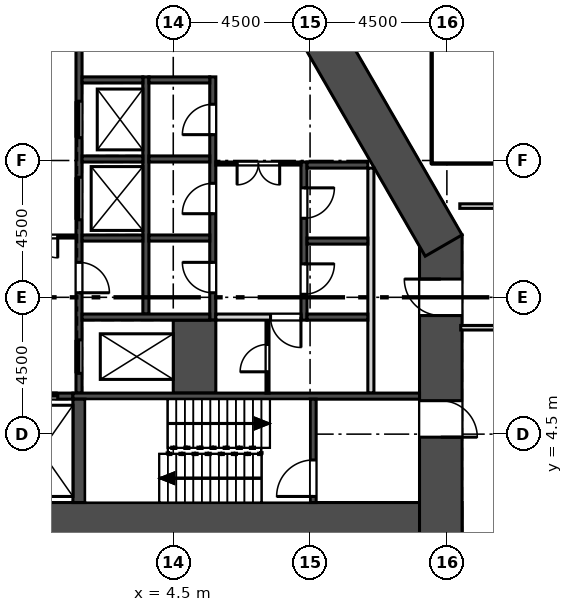
"""IFC4 building model, lengths in metres.
Left out: names, types, materials, properties, quantities, classifications, styles, units other than length and angle.
Written with IfcOpenShell. Run it as: python <this file> out.ifc"""

import sys

from ifc_helpers import new_model, si_unit, direction, frame, frame_2d, origin, place, context, subcontext, project, spatial, rectangle, extrude, element, fill, save


model = new_model("IFC4")
c1 = context("Model", 3, precision=1e-05, world=origin(), true_north=direction((0.0, 1.0)))
c2 = subcontext(c1, "Body", "Model", "MODEL_VIEW")
j1 = project(units=[si_unit("LENGTHUNIT", "METRE"), si_unit("PLANEANGLEUNIT", "RADIAN")], contexts=[c1])
p1 = place(None, origin())
s1 = spatial("IfcSite", under=j1, at=p1, CompositionType="ELEMENT")
p2 = place(p1, origin())
s2 = spatial("IfcBuilding", under=s1, at=p2, CompositionType="ELEMENT")
p3 = place(p2, origin())
s3 = spatial("IfcBuildingStorey", under=s2, at=p3, CompositionType="ELEMENT", Elevation=0.0)
p4 = place(p3, frame((-14.0, 1.55, 0.0), z_axis=(0.0, 0.0, 1.0), x_axis=(1.0, 0.0, 0.0)))
e1 = element("IfcWall", 1, at=p4, inside=s3, PredefinedType="SHEAR", context=c2, shape_type="SweptSolid", body=[
    extrude(rectangle(XDim=28.0, YDim=1.4, at=frame_2d((14.0, 0.0))), origin(), (0.0, 0.0, 1.0), 8.0),
])
p5 = place(p3, frame((13.3, 0.85, 0.0), z_axis=(0.0, 0.0, 1.0), x_axis=(0.0, 1.0, 0.0)))
e2 = element("IfcWall", 2, at=p5, inside=s3, PredefinedType="SHEAR", context=c2, shape_type="SweptSolid", body=[
    extrude(rectangle(XDim=10.202, YDim=1.4, at=frame_2d((5.101, 0.0))), origin(), (0.0, 0.0, 1.0), 8.0),
])
p6 = place(p5, frame((3.55, 0.0, 0.0)))
e3 = element("IfcOpeningElement", 3, at=p6, cuts=e2, PredefinedType="OPENING", context=c2, shape_type="SweptSolid", body=[
    extrude(rectangle(XDim=1.2, YDim=2.1, at=frame_2d((0.6, 1.05))), frame((0.0, 0.71, 0.0), z_axis=(0.0, -1.0, 0.0), x_axis=(1.0, 0.0, 0.0)), (0.0, 0.0, 1.0), 1.42),
])
p7 = place(p5, frame((7.55, 0.0, 0.0)))
e4 = element("IfcOpeningElement", 4, at=p7, cuts=e2, PredefinedType="OPENING", context=c2, shape_type="SweptSolid", body=[
    extrude(rectangle(XDim=1.2, YDim=2.1, at=frame_2d((0.6, 1.05))), frame((0.0, 0.71, 0.0), z_axis=(0.0, -1.0, 0.0), x_axis=(1.0, 0.0, 0.0)), (0.0, 0.0, 1.0), 1.42),
])
p8 = place(p3, frame((13.394, 10.703, 0.0), z_axis=(0.0, 0.0, 1.0), x_axis=(-0.50000187635, 0.866024320471, 0.0)))
e5 = element("IfcWall", 5, at=p8, inside=s3, PredefinedType="SHEAR", context=c2, shape_type="SweptSolid", body=[
    extrude(rectangle(XDim=9.177, YDim=1.4, at=frame_2d((4.588, 0.0))), origin(), (0.0, 0.0, 1.0), 8.0),
])
p9 = place(p3, frame((11.0, 5.85, 0.0), z_axis=(0.0, 0.0, 1.0), x_axis=(0.0, 1.0, 0.0)))
e6 = element("IfcWall", 6, at=p9, inside=s3, PredefinedType="SOLIDWALL", context=c2, shape_type="SweptSolid", body=[
    extrude(rectangle(XDim=7.4, YDim=0.2, at=frame_2d((3.7, 0.0))), origin(), (0.0, 0.0, 1.0), 7.7),
])
p10 = place(p3, frame((8.8, 8.25, -0.4), z_axis=(0.0, 0.0, 1.0), x_axis=(0.0, 1.0, 0.0)))
e7 = element("IfcWall", 7, at=p10, inside=s3, PredefinedType="SOLIDWALL", context=c2, shape_type="SweptSolid", body=[
    extrude(rectangle(XDim=5.2, YDim=0.2, at=frame_2d((2.6, 0.0))), origin(), (0.0, 0.0, 1.0), 8.1),
])
p11 = place(p10, frame((0.85, 0.0, 0.4)))
e8 = element("IfcOpeningElement", 8, at=p11, cuts=e7, PredefinedType="OPENING", context=c2, shape_type="SweptSolid", body=[
    extrude(rectangle(XDim=1.0, YDim=2.1, at=frame_2d((0.5, 1.05))), frame((0.0, 0.11, 0.0), z_axis=(0.0, -1.0, 0.0), x_axis=(1.0, 0.0, 0.0)), (0.0, 0.0, 1.0), 0.22),
])
p12 = place(p10, frame((3.35, 0.0, 0.4)))
e9 = element("IfcOpeningElement", 9, at=p12, cuts=e7, PredefinedType="OPENING", context=c2, shape_type="SweptSolid", body=[
    extrude(rectangle(XDim=1.0, YDim=2.1, at=frame_2d((0.5, 1.05))), frame((0.0, 0.11, 0.0), z_axis=(0.0, -1.0, 0.0), x_axis=(1.0, 0.0, 0.0)), (0.0, 0.0, 1.0), 0.22),
])
p13 = place(p3, frame((5.8, 8.25, -0.4), z_axis=(0.0, 0.0, 1.0), x_axis=(0.0, 1.0, 0.0)))
e10 = element("IfcWall", 10, at=p13, inside=s3, PredefinedType="SOLIDWALL", context=c2, shape_type="SweptSolid", body=[
    extrude(rectangle(XDim=8.0, YDim=0.2, at=frame_2d((4.0, 0.0))), origin(), (0.0, 0.0, 1.0), 8.1),
])
p14 = place(p13, frame((0.9, 0.0, 0.4)))
e11 = element("IfcOpeningElement", 11, at=p14, cuts=e10, PredefinedType="OPENING", context=c2, shape_type="SweptSolid", body=[
    extrude(rectangle(XDim=1.0, YDim=2.1, at=frame_2d((0.5, 1.05))), frame((0.0, 0.11, 0.0), z_axis=(0.0, -1.0, 0.0), x_axis=(1.0, 0.0, 0.0)), (0.0, 0.0, 1.0), 0.22),
])
p15 = place(p13, frame((3.5, 0.0, 0.4)))
e12 = element("IfcOpeningElement", 12, at=p15, cuts=e10, PredefinedType="OPENING", context=c2, shape_type="SweptSolid", body=[
    extrude(rectangle(XDim=1.0, YDim=2.1, at=frame_2d((0.5, 1.05))), frame((0.0, 0.11, 0.0), z_axis=(0.0, -1.0, 0.0), x_axis=(1.0, 0.0, 0.0)), (0.0, 0.0, 1.0), 0.22),
])
p16 = place(p13, frame((6.1, 0.0, 0.4)))
e13 = element("IfcOpeningElement", 13, at=p16, cuts=e10, PredefinedType="OPENING", context=c2, shape_type="SweptSolid", body=[
    extrude(rectangle(XDim=1.0, YDim=2.1, at=frame_2d((0.5, 1.05))), frame((0.0, 0.11, 0.0), z_axis=(0.0, -1.0, 0.0), x_axis=(1.0, 0.0, 0.0)), (0.0, 0.0, 1.0), 0.22),
])
p17 = place(p3, frame((3.6, 8.45, -0.4), z_axis=(0.0, 0.0, 1.0), x_axis=(0.0, 1.0, 0.0)))
e14 = element("IfcWall", 14, at=p17, inside=s3, PredefinedType="SOLIDWALL", context=c2, shape_type="SweptSolid", body=[
    extrude(rectangle(XDim=7.8, YDim=0.2, at=frame_2d((3.9, 0.0))), origin(), (0.0, 0.0, 1.0), 8.1),
])
p18 = place(p3, frame((1.4, 5.85, -0.4), z_axis=(0.0, 0.0, 1.0), x_axis=(0.0, 1.0, 0.0)))
e15 = element("IfcWall", 15, at=p18, inside=s3, PredefinedType="SOLIDWALL", context=c2, shape_type="SweptSolid", body=[
    extrude(rectangle(XDim=11.75, YDim=0.2, at=frame_2d((5.875, 0.0))), origin(), (0.0, 0.0, 1.0), 8.1),
])
p19 = place(p18, frame((5.7, 0.0, 0.4)))
e16 = element("IfcOpeningElement", 16, at=p19, cuts=e15, PredefinedType="OPENING", context=c2, shape_type="SweptSolid", body=[
    extrude(rectangle(XDim=1.4, YDim=2.1, at=frame_2d((0.7, 1.05))), frame((0.0, 0.11, 0.0), z_axis=(0.0, -1.0, 0.0), x_axis=(1.0, 0.0, 0.0)), (0.0, 0.0, 1.0), 0.22),
])
p20 = place(p18, frame((8.4, 0.0, 0.4)))
e17 = element("IfcOpeningElement", 17, at=p20, cuts=e15, PredefinedType="OPENING", context=c2, shape_type="SweptSolid", body=[
    extrude(rectangle(XDim=1.2, YDim=2.1, at=frame_2d((0.6, 1.05))), frame((0.0, 0.11, 0.0), z_axis=(0.0, -1.0, 0.0), x_axis=(1.0, 0.0, 0.0)), (0.0, 0.0, 1.0), 0.22),
])
p21 = place(p18, frame((0.65, 0.0, 0.4)))
e18 = element("IfcOpeningElement", 18, at=p21, cuts=e15, PredefinedType="OPENING", context=c2, shape_type="SweptSolid", body=[
    extrude(rectangle(XDim=1.1, YDim=2.1, at=frame_2d((0.55, 1.05))), frame((0.0, 0.11, 0.0), z_axis=(0.0, -1.0, 0.0), x_axis=(1.0, 0.0, 0.0)), (0.0, 0.0, 1.0), 0.22),
])
p22 = place(p18, frame((3.3, 0.0, 0.4)))
e19 = element("IfcOpeningElement", 19, at=p22, cuts=e15, PredefinedType="OPENING", context=c2, shape_type="SweptSolid", body=[
    extrude(rectangle(XDim=1.0, YDim=2.1, at=frame_2d((0.5, 1.05))), frame((0.0, 0.11, 0.0), z_axis=(0.0, -1.0, 0.0), x_axis=(1.0, 0.0, 0.0)), (0.0, 0.0, 1.0), 0.22),
])
p23 = place(p3, frame((5.2, 5.85, -0.4), z_axis=(0.0, 0.0, 1.0), x_axis=(0.0, 1.0, 0.0)))
e20 = element("IfcWall", 20, at=p23, inside=s3, PredefinedType="SOLIDWALL", context=c2, shape_type="SweptSolid", body=[
    extrude(rectangle(XDim=2.4, YDim=1.4, at=frame_2d((1.2, 0.0))), origin(), (0.0, 0.0, 1.0), 8.1),
])
p24 = place(p3, frame((8.9, 8.35, -0.4), z_axis=(0.0, 0.0, 1.0), x_axis=(1.0, 0.0, 0.0)))
e21 = element("IfcWall", 21, at=p24, inside=s3, PredefinedType="SOLIDWALL", context=c2, shape_type="SweptSolid", body=[
    extrude(rectangle(XDim=2.0, YDim=0.2, at=frame_2d((1.0, 0.0))), origin(), (0.0, 0.0, 1.0), 8.1),
])
p25 = place(p3, frame((1.5, 8.35, -0.4), z_axis=(0.0, 0.0, 1.0), x_axis=(1.0, 0.0, 0.0)))
e22 = element("IfcWall", 22, at=p25, inside=s3, PredefinedType="SOLIDWALL", context=c2, shape_type="SweptSolid", body=[
    extrude(rectangle(XDim=4.2, YDim=0.2, at=frame_2d((2.1, 0.0))), origin(), (0.0, 0.0, 1.0), 8.1),
])
p26 = place(p3, frame((-1.2, 5.75, -0.4), z_axis=(0.0, 0.0, 1.0), x_axis=(1.0, 0.0, 0.0)))
e23 = element("IfcWall", 23, at=p26, inside=s3, PredefinedType="SOLIDWALL", context=c2, shape_type="SweptSolid", body=[
    extrude(rectangle(XDim=2.4, YDim=0.2, at=frame_2d((1.2, 0.0))), origin(), (0.0, 0.0, 1.0), 8.1),
])
p27 = place(p26, frame((0.5, 0.0, 0.4)))
e24 = element("IfcOpeningElement", 24, at=p27, cuts=e23, PredefinedType="OPENING", context=c2, shape_type="SweptSolid", body=[
    extrude(rectangle(XDim=1.4, YDim=2.1, at=frame_2d((0.7, 1.05))), frame((0.0, 0.11, 0.0), z_axis=(0.0, -1.0, 0.0), x_axis=(1.0, 0.0, 0.0)), (0.0, 0.0, 1.0), 0.22),
])
p28 = place(p3, frame((1.2, 5.75, -0.4), z_axis=(0.0, 0.0, 1.0), x_axis=(1.0, 0.0, 0.0)))
e25 = element("IfcWall", 25, at=p28, inside=s3, PredefinedType="SOLIDWALL", context=c2, shape_type="SweptSolid", body=[
    extrude(rectangle(XDim=11.4, YDim=0.2, at=frame_2d((5.7, 0.0))), origin(), (0.0, 0.0, 1.0), 8.1),
])
p29 = place(p3, frame((9.1, 2.25, -0.4), z_axis=(0.0, 0.0, 1.0), x_axis=(0.0, 1.0, 0.0)))
e26 = element("IfcWall", 26, at=p29, inside=s3, PredefinedType="SOLIDWALL", context=c2, shape_type="SweptSolid", body=[
    extrude(rectangle(XDim=3.4, YDim=0.2, at=frame_2d((1.7, 0.0))), origin(), (0.0, 0.0, 1.0), 8.1),
])
p30 = place(p29, frame((0.2, 0.0, 0.4)))
e27 = element("IfcOpeningElement", 27, at=p30, cuts=e26, PredefinedType="OPENING", context=c2, shape_type="SweptSolid", body=[
    extrude(rectangle(XDim=1.2, YDim=2.1, at=frame_2d((0.6, 1.05))), frame((0.0, 0.11, 0.0), z_axis=(0.0, -1.0, 0.0), x_axis=(1.0, 0.0, 0.0)), (0.0, 0.0, 1.0), 0.22),
])
p31 = place(p3, frame((1.4, 2.25, -0.4), z_axis=(0.0, 0.0, 1.0), x_axis=(0.0, 1.0, 0.0)))
e28 = element("IfcWall", 28, at=p31, inside=s3, PredefinedType="SOLIDWALL", context=c2, shape_type="SweptSolid", body=[
    extrude(rectangle(XDim=3.4, YDim=0.4, at=frame_2d((1.7, 0.0))), origin(), (0.0, 0.0, 1.0), 8.1),
])
for number, where, z_axis, x_axis in (
    (29, (8.9, 10.85, -0.4), (0.0, 0.0, 1.0), (1.0, 0.0, 0.0)),
    (30, (8.9, 13.35, -0.4), (0.0, 0.0, 1.0), (1.0, 0.0, 0.0)),
    (31, (3.7, 10.95, -0.4), (0.0, 0.0, 1.0), (1.0, 0.0, 0.0)),
    (32, (3.7, 13.55, -0.4), (0.0, 0.0, 1.0), (1.0, 0.0, 0.0)),
    (33, (3.7, 16.15, -0.4), (0.0, 0.0, 1.0), (1.0, 0.0, 0.0)),
    (34, (1.5, 10.95, -0.4), (0.0, 0.0, 1.0), (1.0, 0.0, 0.0)),
    (35, (1.5, 13.55, -0.4), (0.0, 0.0, 1.0), (1.0, 0.0, 0.0)),
    (36, (1.5, 16.15, -0.4), (0.0, 0.0, 1.0), (1.0, 0.0, 0.0)),
):
    element("IfcWall", number, at=place(p3, frame(where, z_axis=z_axis, x_axis=x_axis)), inside=s3, PredefinedType="SOLIDWALL", context=c2, shape_type="SweptSolid", body=[
        extrude(rectangle(XDim=2.0, YDim=0.2, at=frame_2d((1.0, 0.0))), origin(), (0.0, 0.0, 1.0), 8.1),
    ])
p32 = place(p3, frame((5.9, 13.4, 0.0), z_axis=(0.0, 0.0, 1.0), x_axis=(1.0, 0.0, 0.0)))
e37 = element("IfcWall", 37, at=p32, inside=s3, PredefinedType="PARTITIONING", context=c2, shape_type="SweptSolid", body=[
    extrude(rectangle(XDim=2.8, YDim=0.1, at=frame_2d((1.4, 0.0))), origin(), (0.0, 0.0, 1.0), 7.7),
])
p33 = place(p32, frame((0.7, 0.0, 0.0)))
e38 = element("IfcOpeningElement", 38, at=p33, cuts=e37, PredefinedType="OPENING", context=c2, shape_type="SweptSolid", body=[
    extrude(rectangle(XDim=1.4, YDim=2.1, at=frame_2d((0.7, 1.05))), frame((0.0, 0.06, 0.0), z_axis=(0.0, -1.0, 0.0), x_axis=(1.0, 0.0, 0.0)), (0.0, 0.0, 1.0), 0.12),
])
p34 = place(p3, frame((7.6, 5.85, 0.0), z_axis=(0.0, 0.0, 1.0), x_axis=(0.0, 1.0, 0.0)))
e39 = element("IfcWall", 39, at=p34, inside=s3, PredefinedType="PARTITIONING", context=c2, shape_type="SweptSolid", body=[
    extrude(rectangle(XDim=2.4, YDim=0.1, at=frame_2d((1.2, 0.0))), origin(), (0.0, 0.0, 1.0), 7.7),
])
p35 = place(p34, frame((0.7, 0.0, 0.0)))
e40 = element("IfcOpeningElement", 40, at=p35, cuts=e39, PredefinedType="OPENING", context=c2, shape_type="SweptSolid", body=[
    extrude(rectangle(XDim=0.9, YDim=2.1, at=frame_2d((0.45, 1.05))), frame((0.0, 0.06, 0.0), z_axis=(0.0, -1.0, 0.0), x_axis=(1.0, 0.0, 0.0)), (0.0, 0.0, 1.0), 0.12),
])
p36 = place(p3, frame((5.9, 8.35, 0.0), z_axis=(0.0, 0.0, 1.0), x_axis=(1.0, 0.0, 0.0)))
e41 = element("IfcWall", 41, at=p36, inside=s3, PredefinedType="SOLIDWALL", context=c2, shape_type="SweptSolid", body=[
    extrude(rectangle(XDim=2.8, YDim=0.2, at=frame_2d((1.4, 0.0))), origin(), (0.0, 0.0, 1.0), 7.7),
])
p37 = place(p36, frame((1.8, 0.0, 0.0)))
e42 = element("IfcOpeningElement", 42, at=p37, cuts=e41, PredefinedType="OPENING", context=c2, shape_type="SweptSolid", body=[
    extrude(rectangle(XDim=1.0, YDim=2.1, at=frame_2d((0.5, 1.05))), frame((0.0, 0.11, 0.0), z_axis=(0.0, -1.0, 0.0), x_axis=(1.0, 0.0, 0.0)), (0.0, 0.0, 1.0), 0.22),
])
p38 = place(p3, frame((-1.3, 11.0, 0.0), z_axis=(0.0, 0.0, 1.0), x_axis=(1.0, 0.0, 0.0)))
e43 = element("IfcWall", 43, at=p38, inside=s3, PredefinedType="PARTITIONING", context=c2, shape_type="SweptSolid", body=[
    extrude(rectangle(XDim=2.6, YDim=0.1, at=frame_2d((1.3, 0.0))), origin(), (0.0, 0.0, 1.0), 7.7),
])
p39 = place(p38, frame((0.6, 0.0, 0.0)))
e44 = element("IfcOpeningElement", 44, at=p39, cuts=e43, PredefinedType="OPENING", context=c2, shape_type="SweptSolid", body=[
    extrude(rectangle(XDim=1.4, YDim=2.1, at=frame_2d((0.7, 1.05))), frame((0.0, 0.06, 0.0), z_axis=(0.0, -1.0, 0.0), x_axis=(1.0, 0.0, 0.0)), (0.0, 0.0, 1.0), 0.12),
])
p40 = place(p3, frame((13.955, 8.0, 0.0), z_axis=(0.0, 0.0, 1.0), x_axis=(1.0, 0.0, 0.0)))
e45 = element("IfcWall", 45, at=p40, inside=s3, PredefinedType="PARTITIONING", context=c2, shape_type="SweptSolid", body=[
    extrude(rectangle(XDim=5.97, YDim=0.15, at=frame_2d((2.985, 0.0))), origin(), (0.0, 0.0, 1.0), 7.7),
])
p41 = place(p40, frame((2.445, 0.0, 0.0)))
e46 = element("IfcOpeningElement", 46, at=p41, cuts=e45, PredefinedType="OPENING", context=c2, shape_type="SweptSolid", body=[
    extrude(rectangle(XDim=1.2, YDim=2.1, at=frame_2d((0.6, 1.05))), frame((0.0, 0.085, 0.0), z_axis=(0.0, -1.0, 0.0), x_axis=(1.0, 0.0, 0.0)), (0.0, 0.0, 1.0), 0.17),
])
p42 = place(p3, frame((13.925, 12.0, 0.0), z_axis=(0.0, 0.0, 1.0), x_axis=(1.0, 0.0, 0.0)))
e47 = element("IfcWall", 47, at=p42, inside=s3, PredefinedType="PARTITIONING", context=c2, shape_type="SweptSolid", body=[
    extrude(rectangle(XDim=12.15, YDim=0.15, at=frame_2d((6.075, 0.0))), origin(), (0.0, 0.0, 1.0), 7.7),
])
p43 = place(p42, frame((5.175, 0.0, 0.0)))
e48 = element("IfcOpeningElement", 48, at=p43, cuts=e47, PredefinedType="OPENING", context=c2, shape_type="SweptSolid", body=[
    extrude(rectangle(XDim=1.8, YDim=2.1, at=frame_2d((0.9, 1.05))), frame((0.0, 0.085, 0.0), z_axis=(0.0, -1.0, 0.0), x_axis=(1.0, 0.0, 0.0)), (0.0, 0.0, 1.0), 0.17),
])
p44 = place(p3, frame((13.125, 13.45, 0.0), z_axis=(0.0, 0.0, 1.0), x_axis=(0.0, 1.0, 0.0)))
e49 = element("IfcWall", 49, at=p44, inside=s3, PredefinedType="SOLIDWALL", context=c2, shape_type="SweptSolid", body=[
    extrude(rectangle(XDim=5.1, YDim=0.25, at=frame_2d((2.55, 0.0))), origin(), (0.0, 0.0, 1.0), 7.7),
])
p45 = place(p3, frame((13.125, 13.525, 0.0), z_axis=(0.0, 0.0, 1.0), x_axis=(1.0, 0.0, 0.0)))
e50 = element("IfcWall", 50, at=p45, inside=s3, PredefinedType="SOLIDWALL", context=c2, shape_type="SweptSolid", body=[
    extrude(rectangle(XDim=2.45, YDim=0.25, at=frame_2d((1.225, 0.0))), origin(), (0.0, 0.0, 1.0), 7.7),
])
p46 = place(p19, origin())
e51 = element("IfcDoor", 51, at=p46, inside=s3, OperationType="SLIDING_TO_LEFT", PredefinedType="DOOR", context=c2, shape_type="SweptSolid", body=[
    extrude(rectangle(XDim=1.4, YDim=2.1, at=frame_2d((0.7, 1.05))), frame((0.0, 0.025, 0.0), z_axis=(0.0, -1.0, 0.0), x_axis=(1.0, 0.0, 0.0)), (0.0, 0.0, 1.0), 0.05),
])
fill(e16, e51)
p47 = place(p20, origin())
e52 = element("IfcDoor", 52, at=p47, inside=s3, OperationType="SLIDING_TO_LEFT", PredefinedType="DOOR", context=c2, shape_type="SweptSolid", body=[
    extrude(rectangle(XDim=1.2, YDim=2.1, at=frame_2d((0.6, 1.05))), frame((0.0, 0.025, 0.0), z_axis=(0.0, -1.0, 0.0), x_axis=(1.0, 0.0, 0.0)), (0.0, 0.0, 1.0), 0.05),
])
fill(e17, e52)
p48 = place(p21, origin())
e53 = element("IfcDoor", 53, at=p48, inside=s3, OperationType="SLIDING_TO_RIGHT", PredefinedType="DOOR", context=c2, shape_type="SweptSolid", body=[
    extrude(rectangle(XDim=1.1, YDim=2.1, at=frame_2d((0.55, 1.05))), frame((0.0, 0.025, 0.0), z_axis=(0.0, -1.0, 0.0), x_axis=(1.0, 0.0, 0.0)), (0.0, 0.0, 1.0), 0.05),
])
fill(e18, e53)
p49 = place(p27, origin())
e54 = element("IfcDoor", 54, at=p49, inside=s3, OperationType="SLIDING_TO_LEFT", PredefinedType="DOOR", context=c2, shape_type="SweptSolid", body=[
    extrude(rectangle(XDim=1.4, YDim=2.1, at=frame_2d((0.7, 1.05))), frame((0.0, 0.025, 0.0), z_axis=(0.0, -1.0, 0.0), x_axis=(1.0, 0.0, 0.0)), (0.0, 0.0, 1.0), 0.05),
])
fill(e24, e54)
p50 = place(p11, frame((1.0, 0.0, 0.0), z_axis=(0.0, 0.0, 1.0), x_axis=(-1.0, 0.0, 0.0)))
e55 = element("IfcDoor", 55, at=p50, inside=s3, OperationType="SINGLE_SWING_LEFT", PredefinedType="DOOR", context=c2, shape_type="SweptSolid", body=[
    extrude(rectangle(XDim=1.0, YDim=2.1, at=frame_2d((0.5, 1.05))), frame((0.0, 0.025, 0.0), z_axis=(0.0, -1.0, 0.0), x_axis=(1.0, 0.0, 0.0)), (0.0, 0.0, 1.0), 0.05),
])
fill(e8, e55)
p51 = place(p12, frame((1.0, 0.0, 0.0), z_axis=(0.0, 0.0, 1.0), x_axis=(-1.0, 0.0, 0.0)))
e56 = element("IfcDoor", 56, at=p51, inside=s3, OperationType="SINGLE_SWING_LEFT", PredefinedType="DOOR", context=c2, shape_type="SweptSolid", body=[
    extrude(rectangle(XDim=1.0, YDim=2.1, at=frame_2d((0.5, 1.05))), frame((0.0, 0.025, 0.0), z_axis=(0.0, -1.0, 0.0), x_axis=(1.0, 0.0, 0.0)), (0.0, 0.0, 1.0), 0.05),
])
fill(e9, e56)
p52 = place(p14, origin())
e57 = element("IfcDoor", 57, at=p52, inside=s3, OperationType="SINGLE_SWING_RIGHT", PredefinedType="DOOR", context=c2, shape_type="SweptSolid", body=[
    extrude(rectangle(XDim=1.0, YDim=2.1, at=frame_2d((0.5, 1.05))), frame((0.0, 0.025, 0.0), z_axis=(0.0, -1.0, 0.0), x_axis=(1.0, 0.0, 0.0)), (0.0, 0.0, 1.0), 0.05),
])
fill(e11, e57)
p53 = place(p15, origin())
e58 = element("IfcDoor", 58, at=p53, inside=s3, OperationType="SINGLE_SWING_LEFT", PredefinedType="DOOR", context=c2, shape_type="SweptSolid", body=[
    extrude(rectangle(XDim=1.0, YDim=2.1, at=frame_2d((0.5, 1.05))), frame((0.0, 0.025, 0.0), z_axis=(0.0, -1.0, 0.0), x_axis=(1.0, 0.0, 0.0)), (0.0, 0.0, 1.0), 0.05),
])
fill(e12, e58)
p54 = place(p16, origin())
e59 = element("IfcDoor", 59, at=p54, inside=s3, OperationType="SINGLE_SWING_LEFT", PredefinedType="DOOR", context=c2, shape_type="SweptSolid", body=[
    extrude(rectangle(XDim=1.0, YDim=2.1, at=frame_2d((0.5, 1.05))), frame((0.0, 0.025, 0.0), z_axis=(0.0, -1.0, 0.0), x_axis=(1.0, 0.0, 0.0)), (0.0, 0.0, 1.0), 0.05),
])
fill(e13, e59)
p55 = place(p22, frame((1.0, 0.0, 0.0), z_axis=(0.0, 0.0, 1.0), x_axis=(-1.0, 0.0, 0.0)))
e60 = element("IfcDoor", 60, at=p55, inside=s3, OperationType="SINGLE_SWING_RIGHT", PredefinedType="DOOR", context=c2, shape_type="SweptSolid", body=[
    extrude(rectangle(XDim=1.0, YDim=2.1, at=frame_2d((0.5, 1.05))), frame((0.0, 0.025, 0.0), z_axis=(0.0, -1.0, 0.0), x_axis=(1.0, 0.0, 0.0)), (0.0, 0.0, 1.0), 0.05),
])
fill(e19, e60)
p56 = place(p33, frame((1.4, 0.0, 0.0), z_axis=(0.0, 0.0, 1.0), x_axis=(-1.0, 0.0, 0.0)))
e61 = element("IfcDoor", 61, at=p56, inside=s3, OperationType="DOUBLE_DOOR_SINGLE_SWING", PredefinedType="DOOR", context=c2, shape_type="SweptSolid", body=[
    extrude(rectangle(XDim=1.4, YDim=2.1, at=frame_2d((0.7, 1.05))), frame((0.0, 0.025, 0.0), z_axis=(0.0, -1.0, 0.0), x_axis=(1.0, 0.0, 0.0)), (0.0, 0.0, 1.0), 0.05),
])
fill(e38, e61)
p57 = place(p37, frame((1.0, 0.0, 0.0), z_axis=(0.0, 0.0, 1.0), x_axis=(-1.0, 0.0, 0.0)))
e62 = element("IfcDoor", 62, at=p57, inside=s3, OperationType="SINGLE_SWING_LEFT", PredefinedType="DOOR", context=c2, shape_type="SweptSolid", body=[
    extrude(rectangle(XDim=1.0, YDim=2.1, at=frame_2d((0.5, 1.05))), frame((0.0, 0.025, 0.0), z_axis=(0.0, -1.0, 0.0), x_axis=(1.0, 0.0, 0.0)), (0.0, 0.0, 1.0), 0.05),
])
fill(e42, e62)
p58 = place(p35, origin())
e63 = element("IfcDoor", 63, at=p58, inside=s3, OperationType="SINGLE_SWING_LEFT", PredefinedType="DOOR", context=c2, shape_type="SweptSolid", body=[
    extrude(rectangle(XDim=0.9, YDim=2.1, at=frame_2d((0.45, 1.05))), frame((0.0, 0.025, 0.0), z_axis=(0.0, -1.0, 0.0), x_axis=(1.0, 0.0, 0.0)), (0.0, 0.0, 1.0), 0.05),
])
fill(e40, e63)
p59 = place(p6, frame((1.2, 0.0, 0.0), z_axis=(0.0, 0.0, 1.0), x_axis=(-1.0, 0.0, 0.0)))
e64 = element("IfcDoor", 64, at=p59, inside=s3, OperationType="SINGLE_SWING_RIGHT", PredefinedType="DOOR", context=c2, shape_type="SweptSolid", body=[
    extrude(rectangle(XDim=1.2, YDim=2.1, at=frame_2d((0.6, 1.05))), frame((0.0, 0.425, 0.0), z_axis=(0.0, -1.0, 0.0), x_axis=(1.0, 0.0, 0.0)), (0.0, 0.0, 1.0), 0.05),
])
fill(e3, e64)
p60 = place(p30, origin())
e65 = element("IfcDoor", 65, at=p60, inside=s3, OperationType="SINGLE_SWING_LEFT", PredefinedType="DOOR", context=c2, shape_type="SweptSolid", body=[
    extrude(rectangle(XDim=1.2, YDim=2.1, at=frame_2d((0.6, 1.05))), frame((0.0, 0.025, 0.0), z_axis=(0.0, -1.0, 0.0), x_axis=(1.0, 0.0, 0.0)), (0.0, 0.0, 1.0), 0.05),
])
fill(e27, e65)
p61 = place(p7, origin())
e66 = element("IfcDoor", 66, at=p61, inside=s3, OperationType="SINGLE_SWING_RIGHT", PredefinedType="DOOR", context=c2, shape_type="SweptSolid", body=[
    extrude(rectangle(XDim=1.2, YDim=2.1, at=frame_2d((0.6, 1.05))), frame((0.0, 0.025, 0.0), z_axis=(0.0, -1.0, 0.0), x_axis=(1.0, 0.0, 0.0)), (0.0, 0.0, 1.0), 0.05),
])
fill(e4, e66)
p62 = place(p39, frame((1.4, 0.0, 0.0), z_axis=(0.0, 0.0, 1.0), x_axis=(-1.0, 0.0, 0.0)))
e67 = element("IfcDoor", 67, at=p62, inside=s3, OperationType="DOUBLE_DOOR_SINGLE_SWING", PredefinedType="DOOR", context=c2, shape_type="SweptSolid", body=[
    extrude(rectangle(XDim=1.4, YDim=2.1, at=frame_2d((0.7, 1.05))), frame((0.0, 0.025, 0.0), z_axis=(0.0, -1.0, 0.0), x_axis=(1.0, 0.0, 0.0)), (0.0, 0.0, 1.0), 0.05),
])
fill(e44, e67)
save(model, sys.argv[1])
